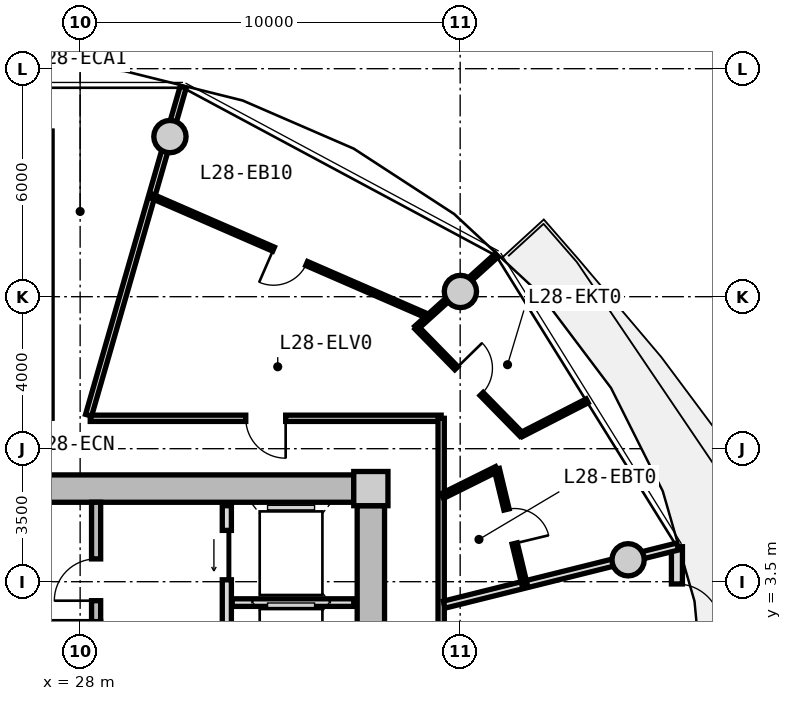
"""IFC4 building model, lengths in metres.
Left out: names, types, materials, properties, quantities, classifications, styles, units other than length and angle.
Written with IfcOpenShell. Run it as: python <this file> out.ifc"""

import sys

from ifc_helpers import new_model, si_unit, direction, frame, frame_2d, origin, origin_2d, place, context, subcontext, project, spatial, rectangle, circle, extrude, source, transform, mapped, element, fill, save


model = new_model("IFC4")
c1 = context("Model", 3, precision=1e-05, world=origin(), true_north=direction((0.0, 1.0)))
c2 = subcontext(c1, "Body", "Model", "MODEL_VIEW")
j1 = project(units=[si_unit("LENGTHUNIT", "METRE"), si_unit("PLANEANGLEUNIT", "RADIAN")], contexts=[c1])
p1 = place(None, origin())
s1 = spatial("IfcSite", under=j1, at=p1, CompositionType="ELEMENT")
p2 = place(p1, origin())
s2 = spatial("IfcBuilding", under=s1, at=p2, CompositionType="ELEMENT")
p3 = place(p2, frame((0.0, 0.0, 93.2)))
s3 = spatial("IfcBuildingStorey", under=s2, at=p3, CompositionType="ELEMENT", Elevation=93.2)
m1 = source(origin(), c2, "Body", "SweptSolid", [
    extrude(rectangle(XDim=0.9, YDim=0.9, at=origin_2d()), origin(), (0.0, 0.0, 1.0), 3.05),
])
p4 = place(p3, frame((35.65, 5.95, 0.0), z_axis=(0.0, 0.0, 1.0), x_axis=(1.0, 0.0, 0.0)))
e1 = element("IfcColumn", 1, at=p4, inside=s3, PredefinedType="COLUMN", context=c2, shape_type="MappedRepresentation", body=[
    mapped(m1, transform((0.0, 0.0, 0.0), x_axis=(1.0, 0.0, 0.0), y_axis=(0.0, 1.0, 0.0), z_axis=(0.0, 0.0, 1.0), scale=1.0)),
])
m2 = source(origin(), c2, "Body", "SweptSolid", [
    extrude(rectangle(XDim=14.4, YDim=0.72, at=frame_2d((7.2, 0.0))), origin(), (0.0, 0.0, 1.0), 2.79),
])
p5 = place(p3, frame((20.8, 5.95, 0.0), z_axis=(0.0, 0.0, 1.0), x_axis=(1.0, 0.0, 0.0)))
e2 = element("IfcWall", 2, at=p5, inside=s3, PredefinedType="SHEAR", context=c2, shape_type="MappedRepresentation", body=[
    mapped(m2, transform((0.0, 0.0, 0.0), x_axis=(1.0, 0.0, 0.0), y_axis=(0.0, 1.0, 0.0), z_axis=(0.0, 0.0, 1.0), scale=1.0)),
])
m3 = source(origin(), c2, "Body", "SweptSolid", [
    extrude(rectangle(XDim=11.0, YDim=0.72, at=frame_2d((5.5, 0.0))), origin(), (0.0, 0.0, 1.0), 2.79),
])
p6 = place(p3, frame((35.65, 5.5, 0.0), z_axis=(0.0, 0.0, 1.0), x_axis=(0.0, -1.0, 0.0)))
e3 = element("IfcWall", 3, at=p6, inside=s3, PredefinedType="SHEAR", context=c2, shape_type="MappedRepresentation", body=[
    mapped(m3, transform((0.0, 0.0, 0.0), x_axis=(1.0, 0.0, 0.0), y_axis=(0.0, 1.0, 0.0), z_axis=(0.0, 0.0, 1.0), scale=1.0)),
])
p7 = place(p6, frame((5.65, 0.0, 0.0)))
e4 = element("IfcOpeningElement", 4, at=p7, cuts=e3, PredefinedType="OPENING", context=c2, shape_type="SweptSolid", body=[
    extrude(rectangle(XDim=1.2, YDim=2.15, at=frame_2d((0.6, 1.075))), frame((0.0, 0.37, 0.0), z_axis=(0.0, -1.0, 0.0), x_axis=(1.0, 0.0, 0.0)), (0.0, 0.0, 1.0), 0.74),
])
p8 = place(p6, frame((9.3, 0.0, 0.0)))
e5 = element("IfcOpeningElement", 5, at=p8, cuts=e3, PredefinedType="OPENING", context=c2, shape_type="SweptSolid", body=[
    extrude(rectangle(XDim=1.0, YDim=2.1, at=frame_2d((0.5, 1.05))), frame((0.0, 0.37, 0.0), z_axis=(0.0, -1.0, 0.0), x_axis=(1.0, 0.0, 0.0)), (0.0, 0.0, 1.0), 0.74),
])
m4 = source(origin(), c2, "Body", "SweptSolid", [
    extrude(circle(Radius=0.425, at=origin_2d()), origin(), (0.0, 0.0, 1.0), 3.05),
])
for number, where, z_axis, x_axis in (
    (6, (42.419, 4.076, 0.0), (0.0, 0.0, 1.0), (1.0, 0.0, 0.0)),
    (7, (38.006, 11.137, 0.0), (0.0, 0.0, 1.0), (1.0, 0.0, 0.0)),
    (8, (30.363, 15.213, 0.0), (0.0, 0.0, 1.0), (1.0, 0.0, 0.0)),
):
    element("IfcColumn", number, at=place(p3, frame(where, z_axis=z_axis, x_axis=x_axis)), inside=s3, PredefinedType="COLUMN", context=c2, shape_type="MappedRepresentation", body=[
        mapped(m4, transform((0.0, 0.0, 0.0), x_axis=(1.0, 0.0, 0.0), y_axis=(0.0, 1.0, 0.0), z_axis=(0.0, 0.0, 1.0), scale=1.0)),
    ])
m5 = source(origin(), c2, "Body", "SweptSolid", [
    extrude(rectangle(XDim=8.841, YDim=0.29, at=frame_2d((4.421, 0.0))), origin(), (0.0, 0.0, 1.0), 2.79),
])
p9 = place(p3, frame((43.704, 4.421, 0.0), z_axis=(0.0, 0.0, 1.0), x_axis=(0.0, -1.0, 0.0)))
e9 = element("IfcWall", 9, at=p9, inside=s3, PredefinedType="SOLIDWALL", context=c2, shape_type="MappedRepresentation", body=[
    mapped(m5, transform((0.0, 0.0, 0.0), x_axis=(1.0, 0.0, 0.0), y_axis=(0.0, 1.0, 0.0), z_axis=(0.0, 0.0, 1.0), scale=1.0)),
])
p10 = place(p9, frame((0.98, 0.0, 0.0)))
e10 = element("IfcOpeningElement", 10, at=p10, cuts=e9, PredefinedType="OPENING", context=c2, shape_type="SweptSolid", body=[
    extrude(rectangle(XDim=1.15, YDim=2.25, at=frame_2d((0.575, 1.125))), frame((0.0, 0.155, 0.0), z_axis=(0.0, -1.0, 0.0), x_axis=(1.0, 0.0, 0.0)), (0.0, 0.0, 1.0), 0.31),
])
p11 = place(p9, frame((4.771, 0.0, 0.85)))
e11 = element("IfcOpeningElement", 11, at=p11, cuts=e9, PredefinedType="OPENING", context=c2, shape_type="SweptSolid", body=[
    extrude(rectangle(XDim=1.2, YDim=1.5, at=frame_2d((0.6, 0.75))), frame((0.0, 0.155, 0.0), z_axis=(0.0, -1.0, 0.0), x_axis=(1.0, 0.0, 0.0)), (0.0, 0.0, 1.0), 0.31),
])
m6 = source(origin(), c2, "Body", "SweptSolid", [
    extrude(rectangle(XDim=3.14, YDim=0.24, at=frame_2d((1.57, 0.0))), origin(), (0.0, 0.0, 1.0), 2.79),
])
p12 = place(p3, frame((28.42, 2.45, 0.0), z_axis=(0.0, 0.0, 1.0), x_axis=(0.0, 1.0, 0.0)))
e12 = element("IfcWall", 12, at=p12, inside=s3, PredefinedType="PARTITIONING", context=c2, shape_type="MappedRepresentation", body=[
    mapped(m6, transform((0.0, 0.0, 0.0), x_axis=(1.0, 0.0, 0.0), y_axis=(0.0, 1.0, 0.0), z_axis=(0.0, 0.0, 1.0), scale=1.0)),
])
p13 = place(p12, frame((0.55, 0.0, 0.0)))
e13 = element("IfcOpeningElement", 13, at=p13, cuts=e12, PredefinedType="OPENING", context=c2, shape_type="SweptSolid", body=[
    extrude(rectangle(XDim=1.1, YDim=2.15, at=frame_2d((0.55, 1.075))), frame((0.0, 0.13, 0.0), z_axis=(0.0, -1.0, 0.0), x_axis=(1.0, 0.0, 0.0)), (0.0, 0.0, 1.0), 0.26),
])
m7 = source(origin(), c2, "Body", "SweptSolid", [
    extrude(rectangle(XDim=5.0, YDim=0.24, at=frame_2d((2.5, 0.0))), origin(), (0.0, 0.0, 1.0), 2.775),
])
p14 = place(p3, frame((31.86, 0.5, 0.0), z_axis=(0.0, 0.0, 1.0), x_axis=(0.0, 1.0, 0.0)))
e14 = element("IfcWall", 14, at=p14, inside=s3, PredefinedType="PARTITIONING", context=c2, shape_type="MappedRepresentation", body=[
    mapped(m7, transform((0.0, 0.0, 0.0), x_axis=(1.0, 0.0, 0.0), y_axis=(0.0, 1.0, 0.0), z_axis=(0.0, 0.0, 1.0), scale=1.0)),
])
p15 = place(p14, frame((3.05, 0.0, 0.0)))
e15 = element("IfcOpeningElement", 15, at=p15, cuts=e14, PredefinedType="OPENING", context=c2, shape_type="SweptSolid", body=[
    extrude(rectangle(XDim=1.3, YDim=2.2, at=frame_2d((0.65, 1.1))), frame((0.0, 0.13, 0.0), z_axis=(0.0, -1.0, 0.0), x_axis=(1.0, 0.0, 0.0)), (0.0, 0.0, 1.0), 0.26),
])
p16 = place(p14, frame((0.55, 0.0, 0.0)))
e16 = element("IfcOpeningElement", 16, at=p16, cuts=e14, PredefinedType="OPENING", context=c2, shape_type="SweptSolid", body=[
    extrude(rectangle(XDim=1.3, YDim=2.2, at=frame_2d((0.65, 1.1))), frame((0.0, 0.13, 0.0), z_axis=(0.0, -1.0, 0.0), x_axis=(1.0, 0.0, 0.0)), (0.0, 0.0, 1.0), 0.26),
])
m8 = source(origin(), c2, "Body", "SweptSolid", [
    extrude(rectangle(XDim=3.2, YDim=0.2, at=frame_2d((1.6, 0.0))), origin(), (0.0, 0.0, 1.0), 2.775),
])
p17 = place(p3, frame((32.0, 2.95, 0.0), z_axis=(0.0, 0.0, 1.0), x_axis=(1.0, 0.0, 0.0)))
e17 = element("IfcWall", 17, at=p17, inside=s3, PredefinedType="PARTITIONING", context=c2, shape_type="MappedRepresentation", body=[
    mapped(m8, transform((0.0, 0.0, 0.0), x_axis=(1.0, 0.0, 0.0), y_axis=(0.0, 1.0, 0.0), z_axis=(0.0, 0.0, 1.0), scale=1.0)),
])
m9 = source(origin(), c2, "Body", "SweptSolid", [
    extrude(rectangle(XDim=9.234, YDim=0.165, at=frame_2d((4.617, 0.0))), origin(), (0.0, 0.0, 1.0), 2.775),
])
p18 = place(p3, frame((28.266, 7.8, 0.0), z_axis=(0.0, 0.0, 1.0), x_axis=(1.0, 0.0, 0.0)))
e18 = element("IfcWall", 18, at=p18, inside=s3, PredefinedType="PARTITIONING", context=c2, shape_type="MappedRepresentation", body=[
    mapped(m9, transform((0.0, 0.0, 0.0), x_axis=(1.0, 0.0, 0.0), y_axis=(0.0, 1.0, 0.0), z_axis=(0.0, 0.0, 1.0), scale=1.0)),
])
p19 = place(p18, frame((4.092, 0.0, 0.0)))
e19 = element("IfcOpeningElement", 19, at=p19, cuts=e18, PredefinedType="OPENING", context=c2, shape_type="SweptSolid", body=[
    extrude(rectangle(XDim=1.05, YDim=2.15, at=frame_2d((0.525, 1.075))), frame((0.0, 0.093, 0.0), z_axis=(0.0, -1.0, 0.0), x_axis=(1.0, 0.0, 0.0)), (0.0, 0.0, 1.0), 0.185),
])
m10 = source(origin(), c2, "Body", "SweptSolid", [
    extrude(rectangle(XDim=15.6, YDim=0.165, at=frame_2d((7.8, 0.0))), origin(), (0.0, 0.0, 1.0), 2.775),
])
p20 = place(p3, frame((37.5, 7.8, 0.0), z_axis=(0.0, 0.0, 1.0), x_axis=(0.0, -1.0, 0.0)))
e20 = element("IfcWall", 20, at=p20, inside=s3, PredefinedType="PARTITIONING", context=c2, shape_type="MappedRepresentation", body=[
    mapped(m10, transform((0.0, 0.0, 0.0), x_axis=(1.0, 0.0, 0.0), y_axis=(0.0, 1.0, 0.0), z_axis=(0.0, 0.0, 1.0), scale=1.0)),
])
p21 = place(p20, frame((9.482, 0.0, 0.0)))
e21 = element("IfcOpeningElement", 21, at=p21, cuts=e20, PredefinedType="OPENING", context=c2, shape_type="SweptSolid", body=[
    extrude(rectangle(XDim=1.25, YDim=2.2, at=frame_2d((0.625, 1.1))), frame((0.0, 0.093, 0.0), z_axis=(0.0, -1.0, 0.0), x_axis=(1.0, 0.0, 0.0)), (0.0, 0.0, 1.0), 0.185),
])
m11 = source(origin(), c2, "Body", "SweptSolid", [
    extrude(rectangle(XDim=8.989, YDim=0.165, at=frame_2d((4.495, 0.0))), origin(), (0.0, 0.0, 1.0), 2.275),
])
p22 = place(p3, frame((28.222, 7.88, 0.0), z_axis=(0.0, 0.0, 1.0), x_axis=(0.27702323008, 0.960863221274, 0.0)))
e22 = element("IfcWall", 22, at=p22, inside=s3, PredefinedType="PARTITIONING", context=c2, shape_type="MappedRepresentation", body=[
    mapped(m11, transform((0.0, 0.0, 0.0), x_axis=(1.0, 0.0, 0.0), y_axis=(0.0, 1.0, 0.0), z_axis=(0.0, 0.0, 1.0), scale=1.0)),
])
m12 = source(origin(), c2, "Body", "SweptSolid", [
    extrude(rectangle(XDim=6.331, YDim=0.19, at=frame_2d((3.165, 0.0))), origin(), (0.0, 0.0, 1.0), 2.275),
])
p23 = place(p3, frame((37.58, 2.896, 0.0), z_axis=(0.0, 0.0, 1.0), x_axis=(0.97036440661, 0.241646267062, 0.0)))
e23 = element("IfcWall", 23, at=p23, inside=s3, PredefinedType="PARTITIONING", context=c2, shape_type="MappedRepresentation", body=[
    mapped(m12, transform((0.0, 0.0, 0.0), x_axis=(1.0, 0.0, 0.0), y_axis=(0.0, 1.0, 0.0), z_axis=(0.0, 0.0, 1.0), scale=1.0)),
])
m13 = source(origin(), c2, "Body", "SweptSolid", [
    extrude(rectangle(XDim=7.938, YDim=0.115, at=frame_2d((3.969, 0.0))), origin(), (0.0, 0.0, 1.0), 2.775),
])
p24 = place(p3, frame((37.164, 10.479, 0.0), z_axis=(0.0, 0.0, 1.0), x_axis=(-0.917052940979, 0.398765474235, 0.0)))
e24 = element("IfcWall", 24, at=p24, inside=s3, PredefinedType="PARTITIONING", context=c2, shape_type="MappedRepresentation", body=[
    mapped(m13, transform((0.0, 0.0, 0.0), x_axis=(1.0, 0.0, 0.0), y_axis=(0.0, 1.0, 0.0), z_axis=(0.0, 0.0, 1.0), scale=1.0)),
])
p25 = place(p24, frame((3.494, 0.0, 0.0)))
e25 = element("IfcOpeningElement", 25, at=p25, cuts=e24, PredefinedType="OPENING", context=c2, shape_type="SweptSolid", body=[
    extrude(rectangle(XDim=0.95, YDim=2.1, at=frame_2d((0.475, 1.05))), frame((0.0, 0.067, 0.0), z_axis=(0.0, -1.0, 0.0), x_axis=(1.0, 0.0, 0.0)), (0.0, 0.0, 1.0), 0.135),
])
m14 = source(origin(), c2, "Body", "SweptSolid", [
    extrude(rectangle(XDim=2.852, YDim=0.115, at=frame_2d((1.426, 0.0))), origin(), (0.0, 0.0, 1.0), 2.275),
])
p26 = place(p3, frame((36.844, 10.18, 0.0), z_axis=(0.0, 0.0, 1.0), x_axis=(0.742190556634, 0.670188911908, 0.0)))
e26 = element("IfcWall", 26, at=p26, inside=s3, PredefinedType="PARTITIONING", context=c2, shape_type="MappedRepresentation", body=[
    mapped(m14, transform((0.0, 0.0, 0.0), x_axis=(1.0, 0.0, 0.0), y_axis=(0.0, 1.0, 0.0), z_axis=(0.0, 0.0, 1.0), scale=1.0)),
])
m15 = source(origin(), c2, "Body", "SweptSolid", [
    extrude(rectangle(XDim=1.6, YDim=0.14, at=frame_2d((0.8, 0.0))), origin(), (0.0, 0.0, 1.0), 2.775),
])
p27 = place(p3, frame((37.53, 5.754, 0.0), z_axis=(0.0, 0.0, 1.0), x_axis=(0.895522919837, 0.445015393044, 0.0)))
e27 = element("IfcWall", 27, at=p27, inside=s3, PredefinedType="PARTITIONING", context=c2, shape_type="MappedRepresentation", body=[
    mapped(m15, transform((0.0, 0.0, 0.0), x_axis=(1.0, 0.0, 0.0), y_axis=(0.0, 1.0, 0.0), z_axis=(0.0, 0.0, 1.0), scale=1.0)),
])
m16 = source(origin(), c2, "Body", "SweptSolid", [
    extrude(rectangle(XDim=3.112, YDim=0.14, at=frame_2d((1.556, 0.0))), origin(), (0.0, 0.0, 1.0), 2.415),
])
p28 = place(p3, frame((38.963, 6.466, 0.0), z_axis=(0.0, 0.0, 1.0), x_axis=(0.233737944029, -0.972299631555, 0.0)))
e28 = element("IfcWall", 28, at=p28, inside=s3, PredefinedType="PARTITIONING", context=c2, shape_type="MappedRepresentation", body=[
    mapped(m16, transform((0.0, 0.0, 0.0), x_axis=(1.0, 0.0, 0.0), y_axis=(0.0, 1.0, 0.0), z_axis=(0.0, 0.0, 1.0), scale=1.0)),
])
p29 = place(p28, frame((1.096, 0.0, 0.0)))
e29 = element("IfcOpeningElement", 29, at=p29, cuts=e28, PredefinedType="OPENING", context=c2, shape_type="SweptSolid", body=[
    extrude(rectangle(XDim=0.92, YDim=2.1, at=frame_2d((0.46, 1.05))), frame((0.0, 0.08, 0.0), z_axis=(0.0, -1.0, 0.0), x_axis=(1.0, 0.0, 0.0)), (0.0, 0.0, 1.0), 0.16),
])
m17 = source(origin(), c2, "Body", "SweptSolid", [
    extrude(rectangle(XDim=1.945, YDim=0.115, at=frame_2d((0.973, 0.0))), origin(), (0.0, 0.0, 1.0), 2.775),
])
p30 = place(p3, frame((39.611, 7.37, 0.0), z_axis=(0.0, 0.0, 1.0), x_axis=(0.889684148329, 0.456576517368, 0.0)))
e30 = element("IfcWall", 30, at=p30, inside=s3, PredefinedType="PARTITIONING", context=c2, shape_type="MappedRepresentation", body=[
    mapped(m17, transform((0.0, 0.0, 0.0), x_axis=(1.0, 0.0, 0.0), y_axis=(0.0, 1.0, 0.0), z_axis=(0.0, 0.0, 1.0), scale=1.0)),
])
m18 = source(origin(), c2, "Body", "SweptSolid", [
    extrude(rectangle(XDim=3.943, YDim=0.115, at=frame_2d((1.972, 0.0))), origin(), (0.0, 0.0, 1.0), 2.775),
])
p31 = place(p3, frame((39.611, 7.37, 0.0), z_axis=(0.0, 0.0, 1.0), x_axis=(-0.699481885754, 0.714650328134, 0.0)))
e31 = element("IfcWall", 31, at=p31, inside=s3, PredefinedType="PARTITIONING", context=c2, shape_type="MappedRepresentation", body=[
    mapped(m18, transform((0.0, 0.0, 0.0), x_axis=(1.0, 0.0, 0.0), y_axis=(0.0, 1.0, 0.0), z_axis=(0.0, 0.0, 1.0), scale=1.0)),
])
p32 = place(p31, frame((1.497, 0.0, 0.0)))
e32 = element("IfcOpeningElement", 32, at=p32, cuts=e31, PredefinedType="OPENING", context=c2, shape_type="SweptSolid", body=[
    extrude(rectangle(XDim=0.95, YDim=2.1, at=frame_2d((0.475, 1.05))), frame((0.0, 0.067, 0.0), z_axis=(0.0, -1.0, 0.0), x_axis=(1.0, 0.0, 0.0)), (0.0, 0.0, 1.0), 0.135),
])
m19 = source(origin(), c2, "Body", "SweptSolid", [
    extrude(rectangle(XDim=1.15, YDim=2.25, at=frame_2d((0.575, 1.125))), frame((0.0, 0.025, 0.0), z_axis=(0.0, -1.0, 0.0), x_axis=(1.0, 0.0, 0.0)), (0.0, 0.0, 1.0), 0.05),
])
p33 = place(p10, origin())
e33 = element("IfcDoor", 33, at=p33, inside=s3, OperationType="SINGLE_SWING_RIGHT", PredefinedType="DOOR", context=c2, shape_type="MappedRepresentation", body=[
    mapped(m19, transform((0.0, 0.0, 0.0), x_axis=(1.0, 0.0, 0.0), y_axis=(0.0, 1.0, 0.0), z_axis=(0.0, 0.0, 1.0), scale=1.0)),
])
fill(e10, e33)
m20 = source(origin(), c2, "Body", "SweptSolid", [
    extrude(rectangle(XDim=1.1, YDim=2.15, at=frame_2d((0.55, 1.075))), frame((0.0, 0.025, 0.0), z_axis=(0.0, -1.0, 0.0), x_axis=(1.0, 0.0, 0.0)), (0.0, 0.0, 1.0), 0.05),
])
p34 = place(p13, origin())
e34 = element("IfcDoor", 34, at=p34, inside=s3, OperationType="SINGLE_SWING_LEFT", PredefinedType="DOOR", context=c2, shape_type="MappedRepresentation", body=[
    mapped(m20, transform((0.0, 0.0, 0.0), x_axis=(1.0, 0.0, 0.0), y_axis=(0.0, 1.0, 0.0), z_axis=(0.0, 0.0, 1.0), scale=1.0)),
])
fill(e13, e34)
m21 = source(origin(), c2, "Body", "SweptSolid", [
    extrude(rectangle(XDim=1.3, YDim=2.2, at=frame_2d((0.65, 1.1))), frame((0.0, 0.025, 0.0), z_axis=(0.0, -1.0, 0.0), x_axis=(1.0, 0.0, 0.0)), (0.0, 0.0, 1.0), 0.05),
])
p35 = place(p15, origin())
e35 = element("IfcDoor", 35, at=p35, inside=s3, OperationType="SLIDING_TO_LEFT", PredefinedType="DOOR", context=c2, shape_type="MappedRepresentation", body=[
    mapped(m21, transform((0.0, 0.0, 0.0), x_axis=(1.0, 0.0, 0.0), y_axis=(0.0, 1.0, 0.0), z_axis=(0.0, 0.0, 1.0), scale=1.0)),
])
fill(e15, e35)
m22 = source(origin(), c2, "Body", "SweptSolid", [
    extrude(rectangle(XDim=1.05, YDim=2.15, at=frame_2d((0.525, 1.075))), frame((0.0, 0.025, 0.0), z_axis=(0.0, -1.0, 0.0), x_axis=(1.0, 0.0, 0.0)), (0.0, 0.0, 1.0), 0.05),
])
p36 = place(p19, frame((1.05, 0.0, 0.0), z_axis=(0.0, 0.0, 1.0), x_axis=(-1.0, 0.0, 0.0)))
e36 = element("IfcDoor", 36, at=p36, inside=s3, OperationType="SINGLE_SWING_LEFT", PredefinedType="DOOR", context=c2, shape_type="MappedRepresentation", body=[
    mapped(m22, transform((0.0, 0.0, 0.0), x_axis=(1.0, 0.0, 0.0), y_axis=(0.0, 1.0, 0.0), z_axis=(0.0, 0.0, 1.0), scale=1.0)),
])
fill(e19, e36)
m23 = source(origin(), c2, "Body", "SweptSolid", [
    extrude(rectangle(XDim=0.92, YDim=2.1, at=frame_2d((0.46, 1.05))), frame((0.0, 0.025, 0.0), z_axis=(0.0, -1.0, 0.0), x_axis=(1.0, 0.0, 0.0)), (0.0, 0.0, 1.0), 0.05),
])
p37 = place(p29, origin())
e37 = element("IfcDoor", 37, at=p37, inside=s3, OperationType="SINGLE_SWING_RIGHT", PredefinedType="DOOR", context=c2, shape_type="MappedRepresentation", body=[
    mapped(m23, transform((0.0, 0.0, 0.0), x_axis=(1.0, 0.0, 0.0), y_axis=(0.0, 1.0, 0.0), z_axis=(0.0, 0.0, 1.0), scale=1.0)),
])
fill(e29, e37)
m24 = source(origin(), c2, "Body", "SweptSolid", [
    extrude(rectangle(XDim=0.95, YDim=2.1, at=frame_2d((0.475, 1.05))), frame((0.0, 0.025, 0.0), z_axis=(0.0, -1.0, 0.0), x_axis=(1.0, 0.0, 0.0)), (0.0, 0.0, 1.0), 0.05),
])
p38 = place(p32, frame((0.95, 0.0, 0.0), z_axis=(0.0, 0.0, 1.0), x_axis=(-1.0, 0.0, 0.0)))
e38 = element("IfcDoor", 38, at=p38, inside=s3, OperationType="SINGLE_SWING_LEFT", PredefinedType="DOOR", context=c2, shape_type="MappedRepresentation", body=[
    mapped(m24, transform((0.0, 0.0, 0.0), x_axis=(1.0, 0.0, 0.0), y_axis=(0.0, 1.0, 0.0), z_axis=(0.0, 0.0, 1.0), scale=1.0)),
])
fill(e32, e38)
p39 = place(p25, origin())
e39 = element("IfcDoor", 39, at=p39, inside=s3, OperationType="SINGLE_SWING_RIGHT", PredefinedType="DOOR", context=c2, shape_type="MappedRepresentation", body=[
    mapped(m24, transform((0.0, 0.0, 0.0), x_axis=(1.0, 0.0, 0.0), y_axis=(0.0, 1.0, 0.0), z_axis=(0.0, 0.0, 1.0), scale=1.0)),
])
fill(e25, e39)
save(model, sys.argv[1])
